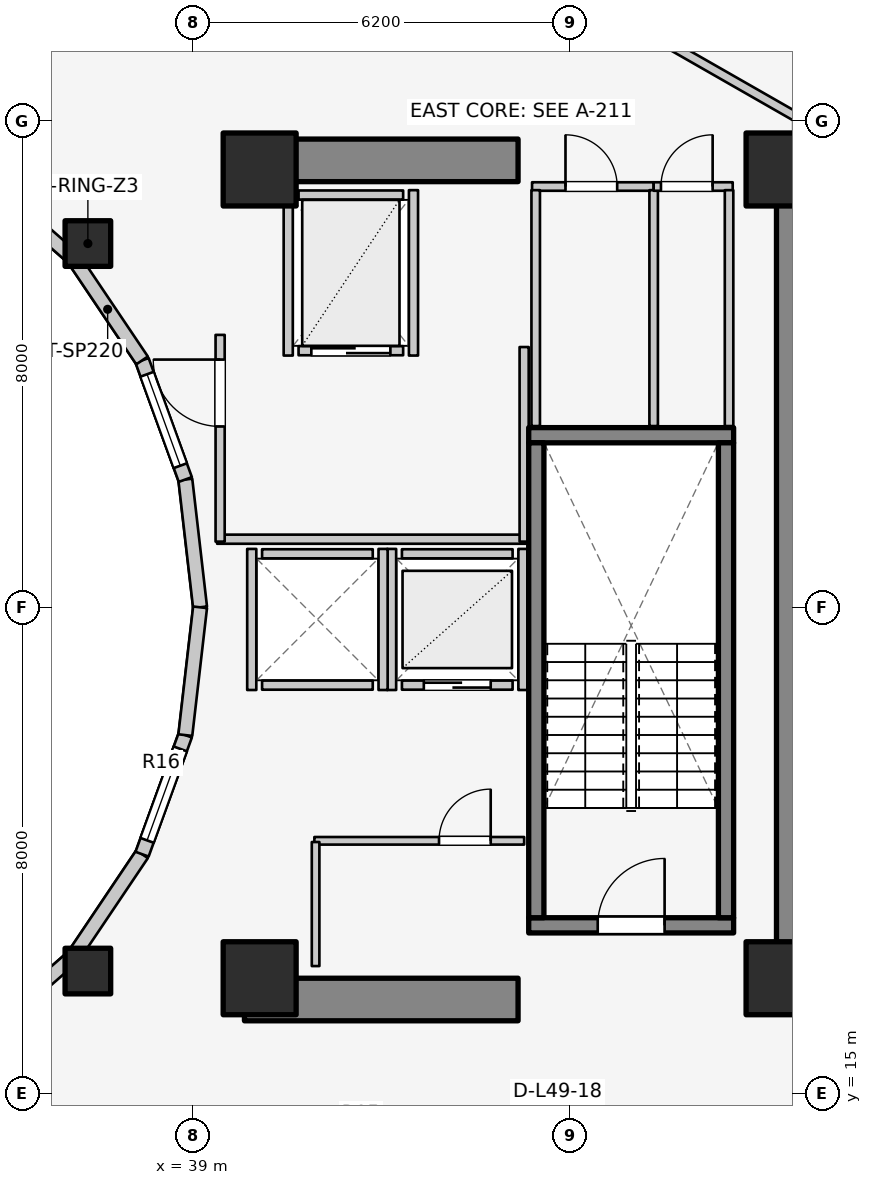
"""IFC4 building model, lengths in metres.
Left out: names, types, materials, properties, quantities, classifications, styles, units other than length and angle.
Written with IfcOpenShell. Run it as: python <this file> out.ifc"""

import sys

from ifc_helpers import new_model, si_unit, direction, frame, frame_2d, origin, origin_2d, place, context, subcontext, project, spatial, rectangle, extrude, element, fill, save


model = new_model("IFC4")
c1 = context("Model", 3, precision=1e-05, world=origin(), true_north=direction((0.0, 1.0)))
c2 = subcontext(c1, "Body", "Model", "MODEL_VIEW")
j1 = project(units=[si_unit("LENGTHUNIT", "METRE"), si_unit("PLANEANGLEUNIT", "RADIAN")], contexts=[c1])
p1 = place(None, origin())
s1 = spatial("IfcSite", under=j1, at=p1, CompositionType="ELEMENT")
p2 = place(p1, origin())
s2 = spatial("IfcBuilding", under=s1, at=p2, CompositionType="ELEMENT")
p3 = place(p2, frame((0.0, 0.0, 162.2)))
s3 = spatial("IfcBuildingStorey", under=s2, at=p3, CompositionType="ELEMENT", Elevation=162.2)
p4 = place(p3, frame((48.95, 17.05, 0.0), z_axis=(0.0, 0.0, 1.0), x_axis=(0.0, 1.0, 0.0)))
e1 = element("IfcWall", 1, at=p4, inside=s3, PredefinedType="SHEAR", context=c2, shape_type="SweptSolid", body=[
    extrude(rectangle(XDim=12.8, YDim=0.7, at=frame_2d((6.4, 0.0))), origin(), (0.0, 0.0, 1.0), 3.1),
])
for number, where, z_axis, x_axis in (
    (2, (39.85, 16.55, 0.0), (0.0, 0.0, 1.0), (1.0, 0.0, 0.0)),
    (3, (39.85, 30.35, 0.0), (0.0, 0.0, 1.0), (1.0, 0.0, 0.0)),
):
    element("IfcWall", number, at=place(p3, frame(where, z_axis=z_axis, x_axis=x_axis)), inside=s3, PredefinedType="SHEAR", context=c2, shape_type="SweptSolid", body=[
        extrude(rectangle(XDim=4.5, YDim=0.7, at=frame_2d((2.25, 0.0))), origin(), (0.0, 0.0, 1.0), 3.1),
    ])
p5 = place(p3, frame((44.525, 17.77, 0.0), z_axis=(0.0, 0.0, 1.0), x_axis=(1.0, 0.0, 0.0)))
e4 = element("IfcWall", 4, at=p5, inside=s3, PredefinedType="SOLIDWALL", context=c2, shape_type="SweptSolid", body=[
    extrude(rectangle(XDim=3.37, YDim=0.25, at=frame_2d((1.685, 0.0))), origin(), (0.0, 0.0, 1.0), 3.1),
])
p6 = place(p5, frame((1.135, 0.0, 0.0)))
e5 = element("IfcOpeningElement", 5, at=p6, cuts=e4, PredefinedType="OPENING", context=c2, shape_type="SweptSolid", body=[
    extrude(rectangle(XDim=1.1, YDim=2.1, at=frame_2d((0.55, 1.05))), frame((0.0, 0.135, 0.0), z_axis=(0.0, -1.0, 0.0), x_axis=(1.0, 0.0, 0.0)), (0.0, 0.0, 1.0), 0.27),
])
p7 = place(p3, frame((44.525, 25.83, 0.0), z_axis=(0.0, 0.0, 1.0), x_axis=(1.0, 0.0, 0.0)))
e6 = element("IfcWall", 6, at=p7, inside=s3, PredefinedType="SOLIDWALL", context=c2, shape_type="SweptSolid", body=[
    extrude(rectangle(XDim=3.37, YDim=0.25, at=frame_2d((1.685, 0.0))), origin(), (0.0, 0.0, 1.0), 3.1),
])
for number, where, z_axis, x_axis in (
    (7, (44.65, 17.895, 0.0), (0.0, 0.0, 1.0), (0.0, 1.0, 0.0)),
    (8, (47.77, 17.895, 0.0), (0.0, 0.0, 1.0), (0.0, 1.0, 0.0)),
):
    element("IfcWall", number, at=place(p3, frame(where, z_axis=z_axis, x_axis=x_axis)), inside=s3, PredefinedType="SOLIDWALL", context=c2, shape_type="SweptSolid", body=[
        extrude(rectangle(XDim=7.81, YDim=0.25, at=frame_2d((3.905, 0.0))), origin(), (0.0, 0.0, 1.0), 3.1),
    ])
for number, where, z_axis, x_axis in (
    (9, (40.1, 16.9, 0.0), (0.0, 0.0, 1.0), (1.0, 0.0, 0.0)),
    (10, (48.7, 16.9, 0.0), (0.0, 0.0, 1.0), (1.0, 0.0, 0.0)),
    (11, (48.7, 30.2, 0.0), (0.0, 0.0, 1.0), (1.0, 0.0, 0.0)),
    (12, (40.1, 30.2, 0.0), (0.0, 0.0, 1.0), (1.0, 0.0, 0.0)),
):
    element("IfcColumn", number, at=place(p3, frame(where, z_axis=z_axis, x_axis=x_axis)), inside=s3, PredefinedType="COLUMN", context=c2, shape_type="SweptSolid", body=[
        extrude(rectangle(XDim=1.2, YDim=1.2, at=origin_2d()), origin(), (0.0, 0.0, 1.0), 3.1),
    ])
for number, where, z_axis, x_axis in (
    (13, (37.275, 28.982, 0.0), (0.0, 0.0, 1.0), (1.0, 0.0, 0.0)),
    (14, (37.275, 17.018, 0.0), (0.0, 0.0, 1.0), (1.0, 0.0, 0.0)),
):
    element("IfcColumn", number, at=place(p3, frame(where, z_axis=z_axis, x_axis=x_axis)), inside=s3, PredefinedType="COLUMN", context=c2, shape_type="SweptSolid", body=[
        extrude(rectangle(XDim=0.75, YDim=0.75, at=origin_2d()), origin(), (0.0, 0.0, 1.0), 3.1),
    ])
p8 = place(p3, frame((39.12, 23.0, 0.0), z_axis=(0.0, 0.0, 1.0), x_axis=(-0.114711713601, 0.993398823617, 0.0)))
e15 = element("IfcWall", 15, at=p8, inside=s3, PredefinedType="STANDARD", context=c2, shape_type="SweptSolid", body=[
    extrude(rectangle(XDim=2.115, YDim=0.23, at=frame_2d((1.058, 0.0))), origin(), (0.0, 0.0, 1.0), 2.84),
])
p9 = place(p3, frame((38.877, 25.102, 0.0), z_axis=(0.0, 0.0, 1.0), x_axis=(-0.341423187295, 0.93990968033, 0.0)))
e16 = element("IfcWall", 16, at=p9, inside=s3, PredefinedType="STANDARD", context=c2, shape_type="SweptSolid", body=[
    extrude(rectangle(XDim=2.084, YDim=0.23, at=frame_2d((1.042, 0.0))), origin(), (0.0, 0.0, 1.0), 2.84),
])
p10 = place(p9, frame((0.242, 0.0, 0.85)))
e17 = element("IfcOpeningElement", 17, at=p10, cuts=e16, PredefinedType="OPENING", context=c2, shape_type="SweptSolid", body=[
    extrude(rectangle(XDim=1.6, YDim=1.65, at=frame_2d((0.8, 0.825))), frame((0.0, 0.125, 0.0), z_axis=(0.0, -1.0, 0.0), x_axis=(1.0, 0.0, 0.0)), (0.0, 0.0, 1.0), 0.25),
])
p11 = place(p3, frame((38.166, 27.06, 0.0), z_axis=(0.0, 0.0, 1.0), x_axis=(-0.558197800898, 0.829707909492, 0.0)))
e18 = element("IfcWall", 18, at=p11, inside=s3, PredefinedType="STANDARD", context=c2, shape_type="SweptSolid", body=[
    extrude(rectangle(XDim=2.027, YDim=0.23, at=frame_2d((1.013, 0.0))), origin(), (0.0, 0.0, 1.0), 2.16),
])
for number, where, z_axis, x_axis in (
    (19, (37.035, 28.742, 0.0), (0.0, 0.0, 1.0), (-0.753, 0.659, 0.0)),
    (20, (35.56, 15.968, 0.0), (0.0, 0.0, 1.0), (0.753, 0.659, 0.0)),
):
    element("IfcWall", number, at=place(p3, frame(where, z_axis=z_axis, x_axis=x_axis)), inside=s3, PredefinedType="STANDARD", context=c2, shape_type="SweptSolid", body=[
        extrude(rectangle(XDim=1.959, YDim=0.23, at=frame_2d((0.98, 0.0))), origin(), (0.0, 0.0, 1.0), 2.16),
    ])
p12 = place(p3, frame((37.035, 17.258, 0.0), z_axis=(0.0, 0.0, 1.0), x_axis=(0.558197800898, 0.829707909492, 0.0)))
e21 = element("IfcWall", 21, at=p12, inside=s3, PredefinedType="STANDARD", context=c2, shape_type="SweptSolid", body=[
    extrude(rectangle(XDim=2.027, YDim=0.23, at=frame_2d((1.013, 0.0))), origin(), (0.0, 0.0, 1.0), 2.16),
])
p13 = place(p3, frame((38.166, 18.94, 0.0), z_axis=(0.0, 0.0, 1.0), x_axis=(0.341423187295, 0.93990968033, 0.0)))
e22 = element("IfcWall", 22, at=p13, inside=s3, PredefinedType="STANDARD", context=c2, shape_type="SweptSolid", body=[
    extrude(rectangle(XDim=2.084, YDim=0.23, at=frame_2d((1.042, 0.0))), origin(), (0.0, 0.0, 1.0), 2.84),
])
p14 = place(p13, frame((0.242, 0.0, 0.85)))
e23 = element("IfcOpeningElement", 23, at=p14, cuts=e22, PredefinedType="OPENING", context=c2, shape_type="SweptSolid", body=[
    extrude(rectangle(XDim=1.6, YDim=1.65, at=frame_2d((0.8, 0.825))), frame((0.0, 0.125, 0.0), z_axis=(0.0, -1.0, 0.0), x_axis=(1.0, 0.0, 0.0)), (0.0, 0.0, 1.0), 0.25),
])
p15 = place(p3, frame((38.877, 20.898, 0.0), z_axis=(0.0, 0.0, 1.0), x_axis=(0.114711713601, 0.993398823617, 0.0)))
e24 = element("IfcWall", 24, at=p15, inside=s3, PredefinedType="STANDARD", context=c2, shape_type="SweptSolid", body=[
    extrude(rectangle(XDim=2.115, YDim=0.23, at=frame_2d((1.058, 0.0))), origin(), (0.0, 0.0, 1.0), 2.84),
])
p16 = place(p3, frame((42.44, 21.72, 0.0), z_axis=(0.0, 0.0, 1.0), x_axis=(1.0, 0.0, 0.0)))
e25 = element("IfcWall", 25, at=p16, inside=s3, PredefinedType="SOLIDWALL", context=c2, shape_type="SweptSolid", body=[
    extrude(rectangle(XDim=1.82, YDim=0.15, at=frame_2d((0.91, 0.0))), origin(), (0.0, 0.0, 1.0), 2.855),
])
p17 = place(p16, frame((0.36, 0.0, 0.0)))
e26 = element("IfcOpeningElement", 26, at=p17, cuts=e25, PredefinedType="OPENING", context=c2, shape_type="SweptSolid", body=[
    extrude(rectangle(XDim=1.1, YDim=2.1, at=frame_2d((0.55, 1.05))), frame((0.0, 0.085, 0.0), z_axis=(0.0, -1.0, 0.0), x_axis=(1.0, 0.0, 0.0)), (0.0, 0.0, 1.0), 0.17),
])
p18 = place(p3, frame((42.44, 23.88, 0.0), z_axis=(0.0, 0.0, 1.0), x_axis=(1.0, 0.0, 0.0)))
e27 = element("IfcWall", 27, at=p18, inside=s3, PredefinedType="SOLIDWALL", context=c2, shape_type="SweptSolid", body=[
    extrude(rectangle(XDim=1.82, YDim=0.15, at=frame_2d((0.91, 0.0))), origin(), (0.0, 0.0, 1.0), 2.855),
])
for number, where, z_axis, x_axis in (
    (28, (42.27, 21.64, 0.0), (0.0, 0.0, 1.0), (0.0, 1.0, 0.0)),
    (29, (44.43, 21.64, 0.0), (0.0, 0.0, 1.0), (0.0, 1.0, 0.0)),
):
    element("IfcWall", number, at=place(p3, frame(where, z_axis=z_axis, x_axis=x_axis)), inside=s3, PredefinedType="SOLIDWALL", context=c2, shape_type="SweptSolid", body=[
        extrude(rectangle(XDim=2.32, YDim=0.15, at=frame_2d((1.16, 0.0))), origin(), (0.0, 0.0, 1.0), 2.855),
    ])
for number, where, z_axis, x_axis in (
    (30, (40.14, 21.72, 0.0), (0.0, 0.0, 1.0), (1.0, 0.0, 0.0)),
    (31, (40.14, 23.88, 0.0), (0.0, 0.0, 1.0), (1.0, 0.0, 0.0)),
):
    element("IfcWall", number, at=place(p3, frame(where, z_axis=z_axis, x_axis=x_axis)), inside=s3, PredefinedType="SOLIDWALL", context=c2, shape_type="SweptSolid", body=[
        extrude(rectangle(XDim=1.82, YDim=0.15, at=frame_2d((0.91, 0.0))), origin(), (0.0, 0.0, 1.0), 2.12),
    ])
p19 = place(p3, frame((39.97, 21.64, 0.0), z_axis=(0.0, 0.0, 1.0), x_axis=(0.0, 1.0, 0.0)))
e32 = element("IfcWall", 32, at=p19, inside=s3, PredefinedType="SOLIDWALL", context=c2, shape_type="SweptSolid", body=[
    extrude(rectangle(XDim=2.32, YDim=0.15, at=frame_2d((1.16, 0.0))), origin(), (0.0, 0.0, 1.0), 2.12),
])
p20 = place(p3, frame((42.13, 21.64, 0.0), z_axis=(0.0, 0.0, 1.0), x_axis=(0.0, 1.0, 0.0)))
e33 = element("IfcWall", 33, at=p20, inside=s3, PredefinedType="SOLIDWALL", context=c2, shape_type="SweptSolid", body=[
    extrude(rectangle(XDim=2.32, YDim=0.15, at=frame_2d((1.16, 0.0))), origin(), (0.0, 0.0, 1.0), 2.855),
])
p21 = place(p3, frame((40.74, 27.22, 0.0), z_axis=(0.0, 0.0, 1.0), x_axis=(1.0, 0.0, 0.0)))
e34 = element("IfcWall", 34, at=p21, inside=s3, PredefinedType="SOLIDWALL", context=c2, shape_type="SweptSolid", body=[
    extrude(rectangle(XDim=1.72, YDim=0.15, at=frame_2d((0.86, 0.0))), origin(), (0.0, 0.0, 1.0), 2.855),
])
p22 = place(p21, frame((0.21, 0.0, 0.0)))
e35 = element("IfcOpeningElement", 35, at=p22, cuts=e34, PredefinedType="OPENING", context=c2, shape_type="SweptSolid", body=[
    extrude(rectangle(XDim=1.3, YDim=2.1, at=frame_2d((0.65, 1.05))), frame((0.0, 0.085, 0.0), z_axis=(0.0, -1.0, 0.0), x_axis=(1.0, 0.0, 0.0)), (0.0, 0.0, 1.0), 0.17),
])
p23 = place(p3, frame((40.74, 29.78, 0.0), z_axis=(0.0, 0.0, 1.0), x_axis=(1.0, 0.0, 0.0)))
e36 = element("IfcWall", 36, at=p23, inside=s3, PredefinedType="SOLIDWALL", context=c2, shape_type="SweptSolid", body=[
    extrude(rectangle(XDim=1.72, YDim=0.15, at=frame_2d((0.86, 0.0))), origin(), (0.0, 0.0, 1.0), 2.855),
])
for number, where, z_axis, x_axis in (
    (37, (40.57, 27.14, 0.0), (0.0, 0.0, 1.0), (0.0, 1.0, 0.0)),
    (38, (42.63, 27.14, 0.0), (0.0, 0.0, 1.0), (0.0, 1.0, 0.0)),
):
    element("IfcWall", number, at=place(p3, frame(where, z_axis=z_axis, x_axis=x_axis)), inside=s3, PredefinedType="SOLIDWALL", context=c2, shape_type="SweptSolid", body=[
        extrude(rectangle(XDim=2.72, YDim=0.15, at=frame_2d((1.36, 0.0))), origin(), (0.0, 0.0, 1.0), 2.855),
    ])
p24 = place(p3, frame((39.4, 24.12, 0.0), z_axis=(0.0, 0.0, 1.0), x_axis=(1.0, 0.0, 0.0)))
e39 = element("IfcWall", 39, at=p24, inside=s3, PredefinedType="PARTITIONING", context=c2, shape_type="SweptSolid", body=[
    extrude(rectangle(XDim=5.08, YDim=0.15, at=frame_2d((2.54, 0.0))), origin(), (0.0, 0.0, 1.0), 2.12),
])
p25 = place(p3, frame((44.45, 24.08, 0.0), z_axis=(0.0, 0.0, 1.0), x_axis=(0.0, 1.0, 0.0)))
e40 = element("IfcWall", 40, at=p25, inside=s3, PredefinedType="PARTITIONING", context=c2, shape_type="SweptSolid", body=[
    extrude(rectangle(XDim=3.2, YDim=0.15, at=frame_2d((1.6, 0.0))), origin(), (0.0, 0.0, 1.0), 2.855),
])
p26 = place(p3, frame((39.45, 24.08, 0.0), z_axis=(0.0, 0.0, 1.0), x_axis=(0.0, 1.0, 0.0)))
e41 = element("IfcWall", 41, at=p26, inside=s3, PredefinedType="PARTITIONING", context=c2, shape_type="SweptSolid", body=[
    extrude(rectangle(XDim=3.4, YDim=0.15, at=frame_2d((1.7, 0.0))), origin(), (0.0, 0.0, 1.0), 2.855),
])
p27 = place(p26, frame((1.894, 0.0, 0.0)))
e42 = element("IfcOpeningElement", 42, at=p27, cuts=e41, PredefinedType="OPENING", context=c2, shape_type="SweptSolid", body=[
    extrude(rectangle(XDim=1.1, YDim=2.1, at=frame_2d((0.55, 1.05))), frame((0.0, 0.085, 0.0), z_axis=(0.0, -1.0, 0.0), x_axis=(1.0, 0.0, 0.0)), (0.0, 0.0, 1.0), 0.17),
])
p28 = place(p3, frame((41.0, 19.16, 0.0), z_axis=(0.0, 0.0, 1.0), x_axis=(1.0, 0.0, 0.0)))
e43 = element("IfcWall", 43, at=p28, inside=s3, PredefinedType="PARTITIONING", context=c2, shape_type="SweptSolid", body=[
    extrude(rectangle(XDim=3.45, YDim=0.125, at=frame_2d((1.725, 0.0))), origin(), (0.0, 0.0, 1.0), 2.12),
])
p29 = place(p28, frame((2.05, 0.0, 0.0)))
e44 = element("IfcOpeningElement", 44, at=p29, cuts=e43, PredefinedType="OPENING", context=c2, shape_type="SweptSolid", body=[
    extrude(rectangle(XDim=0.85, YDim=2.05, at=frame_2d((0.425, 1.025))), frame((0.0, 0.073, 0.0), z_axis=(0.0, -1.0, 0.0), x_axis=(1.0, 0.0, 0.0)), (0.0, 0.0, 1.0), 0.145),
])
p30 = place(p3, frame((41.02, 17.1, 0.0), z_axis=(0.0, 0.0, 1.0), x_axis=(0.0, 1.0, 0.0)))
e45 = element("IfcWall", 45, at=p30, inside=s3, PredefinedType="PARTITIONING", context=c2, shape_type="SweptSolid", body=[
    extrude(rectangle(XDim=2.04, YDim=0.125, at=frame_2d((1.02, 0.0))), origin(), (0.0, 0.0, 1.0), 2.855),
])
p31 = place(p3, frame((44.58, 29.92, 0.0), z_axis=(0.0, 0.0, 1.0), x_axis=(1.0, 0.0, 0.0)))
e46 = element("IfcWall", 46, at=p31, inside=s3, PredefinedType="PLUMBINGWALL", context=c2, shape_type="SweptSolid", body=[
    extrude(rectangle(XDim=2.0, YDim=0.14, at=frame_2d((1.0, 0.0))), origin(), (0.0, 0.0, 1.0), 2.855),
])
p32 = place(p31, frame((0.55, 0.0, 0.0)))
e47 = element("IfcOpeningElement", 47, at=p32, cuts=e46, PredefinedType="OPENING", context=c2, shape_type="SweptSolid", body=[
    extrude(rectangle(XDim=0.85, YDim=2.05, at=frame_2d((0.425, 1.025))), frame((0.0, 0.08, 0.0), z_axis=(0.0, -1.0, 0.0), x_axis=(1.0, 0.0, 0.0)), (0.0, 0.0, 1.0), 0.16),
])
for number, where, z_axis, x_axis in (
    (48, (44.64, 25.98, 0.0), (0.0, 0.0, 1.0), (0.0, 1.0, 0.0)),
    (49, (46.58, 25.98, 0.0), (0.0, 0.0, 1.0), (0.0, 1.0, 0.0)),
):
    element("IfcWall", number, at=place(p3, frame(where, z_axis=z_axis, x_axis=x_axis)), inside=s3, PredefinedType="PLUMBINGWALL", context=c2, shape_type="SweptSolid", body=[
        extrude(rectangle(XDim=3.88, YDim=0.14, at=frame_2d((1.94, 0.0))), origin(), (0.0, 0.0, 1.0), 2.855),
    ])
p33 = place(p3, frame((46.58, 29.92, 0.0), z_axis=(0.0, 0.0, 1.0), x_axis=(1.0, 0.0, 0.0)))
e50 = element("IfcWall", 50, at=p33, inside=s3, PredefinedType="PLUMBINGWALL", context=c2, shape_type="SweptSolid", body=[
    extrude(rectangle(XDim=1.3, YDim=0.14, at=frame_2d((0.65, 0.0))), origin(), (0.0, 0.0, 1.0), 2.855),
])
p34 = place(p33, frame((0.12, 0.0, 0.0)))
e51 = element("IfcOpeningElement", 51, at=p34, cuts=e50, PredefinedType="OPENING", context=c2, shape_type="SweptSolid", body=[
    extrude(rectangle(XDim=0.85, YDim=2.05, at=frame_2d((0.425, 1.025))), frame((0.0, 0.08, 0.0), z_axis=(0.0, -1.0, 0.0), x_axis=(1.0, 0.0, 0.0)), (0.0, 0.0, 1.0), 0.16),
])
p35 = place(p3, frame((47.82, 25.98, 0.0), z_axis=(0.0, 0.0, 1.0), x_axis=(0.0, 1.0, 0.0)))
e52 = element("IfcWall", 52, at=p35, inside=s3, PredefinedType="PLUMBINGWALL", context=c2, shape_type="SweptSolid", body=[
    extrude(rectangle(XDim=3.88, YDim=0.14, at=frame_2d((1.94, 0.0))), origin(), (0.0, 0.0, 1.0), 2.855),
])
p36 = place(p3, frame((46.757, 32.305, 0.0), z_axis=(0.0, 0.0, 1.0), x_axis=(0.867991349648, -0.496579315857, 0.0)))
e53 = element("IfcWall", 53, at=p36, inside=s3, PredefinedType="PARTITIONING", context=c2, shape_type="SweptSolid", body=[
    extrude(rectangle(XDim=2.567, YDim=0.15, at=frame_2d((1.283, 0.0))), origin(), (0.0, 0.0, 1.0), 2.22),
])
p37 = place(p3, frame((35.55, 15.985, 0.0), z_axis=(0.0, 0.0, 1.0), x_axis=(0.525627246902, -0.850714991824, 0.0)))
e54 = element("IfcWall", 54, at=p37, inside=s3, PredefinedType="PARTITIONING", context=c2, shape_type="SweptSolid", body=[
    extrude(rectangle(XDim=2.901, YDim=0.125, at=frame_2d((1.451, 0.0))), origin(), (0.0, 0.0, 1.0), 2.299),
])
p38 = place(p10, origin())
e55 = element("IfcWindow", 55, at=p38, inside=s3, PartitioningType="SINGLE_PANEL", PredefinedType="WINDOW", context=c2, shape_type="SweptSolid", body=[
    extrude(rectangle(XDim=1.6, YDim=1.65, at=frame_2d((0.8, 0.825))), frame((0.0, 0.03, 0.0), z_axis=(0.0, -1.0, 0.0), x_axis=(1.0, 0.0, 0.0)), (0.0, 0.0, 1.0), 0.06),
])
fill(e17, e55)
p39 = place(p14, origin())
e56 = element("IfcWindow", 56, at=p39, inside=s3, PartitioningType="SINGLE_PANEL", PredefinedType="WINDOW", context=c2, shape_type="SweptSolid", body=[
    extrude(rectangle(XDim=1.6, YDim=1.65, at=frame_2d((0.8, 0.825))), frame((0.0, 0.03, 0.0), z_axis=(0.0, -1.0, 0.0), x_axis=(1.0, 0.0, 0.0)), (0.0, 0.0, 1.0), 0.06),
])
fill(e23, e56)
p40 = place(p6, origin())
e57 = element("IfcDoor", 57, at=p40, inside=s3, OperationType="SINGLE_SWING_RIGHT", PredefinedType="DOOR", context=c2, shape_type="SweptSolid", body=[
    extrude(rectangle(XDim=1.1, YDim=2.1, at=frame_2d((0.55, 1.05))), frame((0.0, 0.025, 0.0), z_axis=(0.0, -1.0, 0.0), x_axis=(1.0, 0.0, 0.0)), (0.0, 0.0, 1.0), 0.05),
])
fill(e5, e57)
p41 = place(p17, origin())
e58 = element("IfcDoor", 58, at=p41, inside=s3, OperationType="DOUBLE_DOOR_SLIDING", PredefinedType="DOOR", context=c2, shape_type="SweptSolid", body=[
    extrude(rectangle(XDim=1.1, YDim=2.1, at=frame_2d((0.55, 1.05))), frame((0.0, 0.025, 0.0), z_axis=(0.0, -1.0, 0.0), x_axis=(1.0, 0.0, 0.0)), (0.0, 0.0, 1.0), 0.05),
])
fill(e26, e58)
p42 = place(p22, origin())
e59 = element("IfcDoor", 59, at=p42, inside=s3, OperationType="DOUBLE_DOOR_SLIDING", PredefinedType="DOOR", context=c2, shape_type="SweptSolid", body=[
    extrude(rectangle(XDim=1.3, YDim=2.1, at=frame_2d((0.65, 1.05))), frame((0.0, 0.025, 0.0), z_axis=(0.0, -1.0, 0.0), x_axis=(1.0, 0.0, 0.0)), (0.0, 0.0, 1.0), 0.05),
])
fill(e35, e59)
p43 = place(p27, origin())
e60 = element("IfcDoor", 60, at=p43, inside=s3, OperationType="SINGLE_SWING_RIGHT", PredefinedType="DOOR", context=c2, shape_type="SweptSolid", body=[
    extrude(rectangle(XDim=1.1, YDim=2.1, at=frame_2d((0.55, 1.05))), frame((0.0, 0.025, 0.0), z_axis=(0.0, -1.0, 0.0), x_axis=(1.0, 0.0, 0.0)), (0.0, 0.0, 1.0), 0.05),
])
fill(e42, e60)
p44 = place(p29, origin())
e61 = element("IfcDoor", 61, at=p44, inside=s3, OperationType="SINGLE_SWING_RIGHT", PredefinedType="DOOR", context=c2, shape_type="SweptSolid", body=[
    extrude(rectangle(XDim=0.85, YDim=2.05, at=frame_2d((0.425, 1.025))), frame((0.0, 0.025, 0.0), z_axis=(0.0, -1.0, 0.0), x_axis=(1.0, 0.0, 0.0)), (0.0, 0.0, 1.0), 0.05),
])
fill(e44, e61)
p45 = place(p32, origin())
e62 = element("IfcDoor", 62, at=p45, inside=s3, OperationType="SINGLE_SWING_LEFT", PredefinedType="DOOR", context=c2, shape_type="SweptSolid", body=[
    extrude(rectangle(XDim=0.85, YDim=2.05, at=frame_2d((0.425, 1.025))), frame((0.0, 0.025, 0.0), z_axis=(0.0, -1.0, 0.0), x_axis=(1.0, 0.0, 0.0)), (0.0, 0.0, 1.0), 0.05),
])
fill(e47, e62)
p46 = place(p34, origin())
e63 = element("IfcDoor", 63, at=p46, inside=s3, OperationType="SINGLE_SWING_RIGHT", PredefinedType="DOOR", context=c2, shape_type="SweptSolid", body=[
    extrude(rectangle(XDim=0.85, YDim=2.05, at=frame_2d((0.425, 1.025))), frame((0.0, 0.025, 0.0), z_axis=(0.0, -1.0, 0.0), x_axis=(1.0, 0.0, 0.0)), (0.0, 0.0, 1.0), 0.05),
])
fill(e51, e63)
save(model, sys.argv[1])
